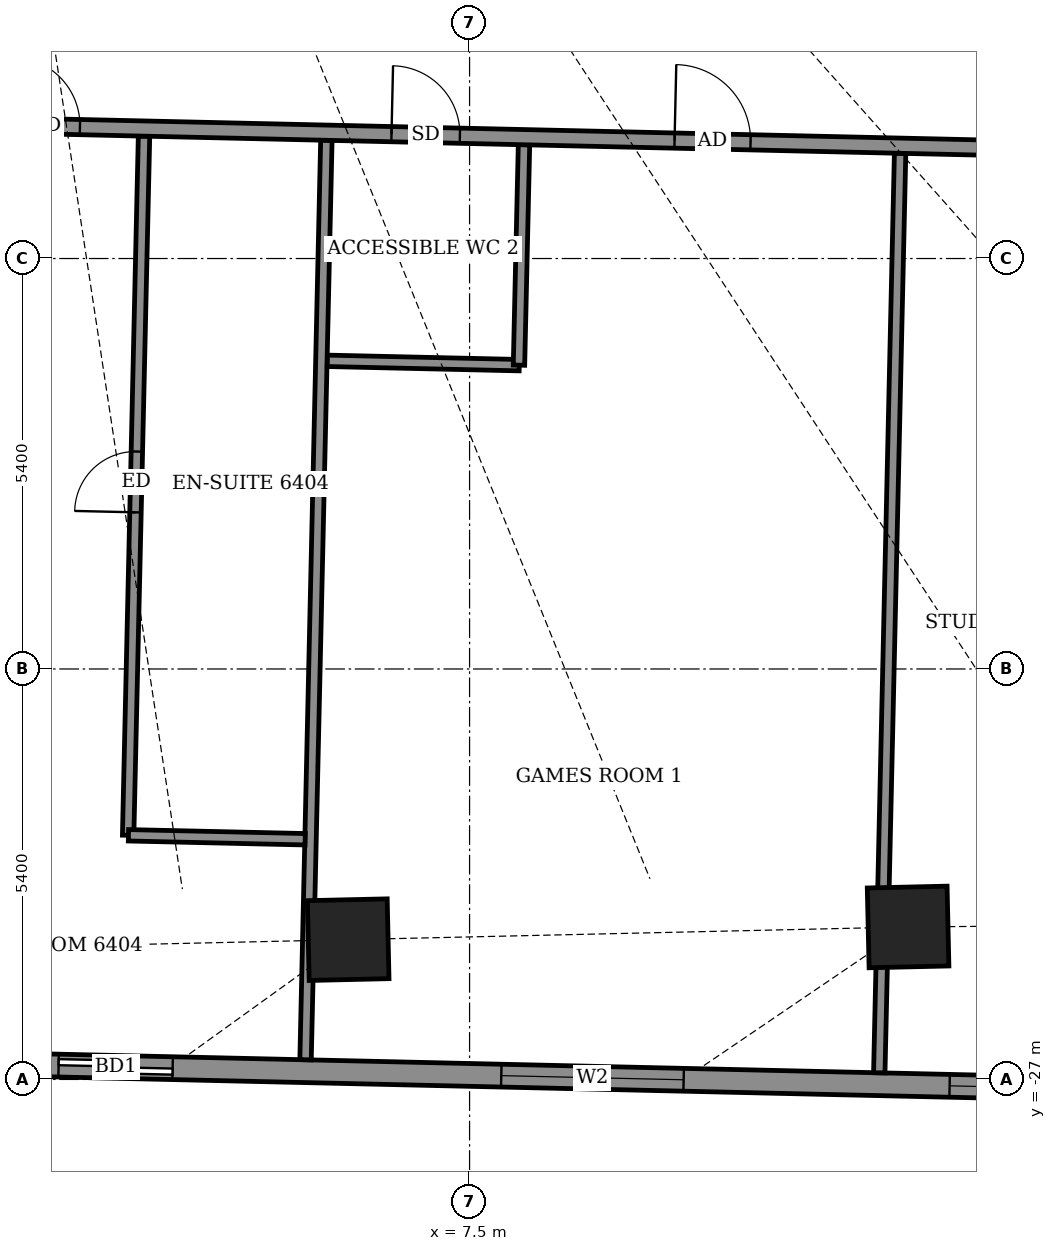
"""IFC4 building model, lengths in metres.
Left out: names, types, materials, properties, quantities, classifications, styles, units other than length and angle.
Written with IfcOpenShell. Run it as: python <this file> out.ifc"""

import sys

from ifc_helpers import new_model, si_unit, direction, frame, frame_2d, origin, origin_2d, place, context, subcontext, project, spatial, rectangle, extrude, element, fill, save


model = new_model("IFC4")
c1 = context("Model", 3, precision=1e-05, world=origin(), true_north=direction((0.0, 1.0)))
c2 = subcontext(c1, "Body", "Model", "MODEL_VIEW")
j1 = project(units=[si_unit("LENGTHUNIT", "METRE"), si_unit("PLANEANGLEUNIT", "RADIAN")], contexts=[c1])
p1 = place(None, origin())
s1 = spatial("IfcSite", under=j1, at=p1, CompositionType="ELEMENT")
p2 = place(p1, origin())
s2 = spatial("IfcBuilding", under=s1, at=p2, CompositionType="ELEMENT")
p3 = place(p2, frame((0.0, 0.0, 252.7)))
s3 = spatial("IfcBuildingStorey", under=s2, at=p3, CompositionType="ELEMENT", Elevation=252.7)
for number, where, z_axis, x_axis in (
    (1, (5.903, -25.161, -0.55), (0.0, 0.0, 1.0), (1.0, 0.023, 0.0)),
    (2, (13.269, -24.994, -0.55), (0.0, 0.0, 1.0), (1.0, 0.023, 0.0)),
):
    element("IfcColumn", number, at=place(p3, frame(where, z_axis=z_axis, x_axis=x_axis)), inside=s3, PredefinedType="COLUMN", context=c2, shape_type="SweptSolid", body=[
        extrude(rectangle(XDim=1.05, YDim=1.05, at=origin_2d()), origin(), (0.0, 0.0, 1.0), 4.6),
    ])
p4 = place(p3, frame((-22.95, -26.249, 0.0), z_axis=(0.0, 0.0, 1.0), x_axis=(0.999742196137, -0.022705533743, 0.0)))
e3 = element("IfcWall", 3, at=p4, inside=s3, PredefinedType="SOLIDWALL", context=c2, shape_type="SweptSolid", body=[
    extrude(rectangle(XDim=47.171, YDim=0.3, at=frame_2d((23.585, 0.0))), origin(), (0.0, 0.0, 1.0), 2.45),
])
p5 = place(p4, frame((2.534, 0.0, 0.0)))
e4 = element("IfcOpeningElement", 4, at=p5, cuts=e3, PredefinedType="OPENING", context=c2, shape_type="SweptSolid", body=[
    extrude(rectangle(XDim=1.5, YDim=2.4, at=frame_2d((0.75, 1.2))), frame((0.0, 0.16, 0.0), z_axis=(0.0, -1.0, 0.0), x_axis=(1.0, 0.0, 0.0)), (0.0, 0.0, 1.0), 0.32),
])
p6 = place(p4, frame((10.05, 0.0, 0.0)))
e5 = element("IfcOpeningElement", 5, at=p6, cuts=e3, PredefinedType="OPENING", context=c2, shape_type="SweptSolid", body=[
    extrude(rectangle(XDim=1.5, YDim=2.4, at=frame_2d((0.75, 1.2))), frame((0.0, 0.16, 0.0), z_axis=(0.0, -1.0, 0.0), x_axis=(1.0, 0.0, 0.0)), (0.0, 0.0, 1.0), 0.32),
])
p7 = place(p4, frame((15.599, 0.0, 0.0)))
e6 = element("IfcOpeningElement", 6, at=p7, cuts=e3, PredefinedType="OPENING", context=c2, shape_type="SweptSolid", body=[
    extrude(rectangle(XDim=1.5, YDim=2.4, at=frame_2d((0.75, 1.2))), frame((0.0, 0.16, 0.0), z_axis=(0.0, -1.0, 0.0), x_axis=(1.0, 0.0, 0.0)), (0.0, 0.0, 1.0), 0.32),
])
p8 = place(p4, frame((18.981, 0.0, 0.0)))
e7 = element("IfcOpeningElement", 7, at=p8, cuts=e3, PredefinedType="OPENING", context=c2, shape_type="SweptSolid", body=[
    extrude(rectangle(XDim=1.5, YDim=2.4, at=frame_2d((0.75, 1.2))), frame((0.0, 0.16, 0.0), z_axis=(0.0, -1.0, 0.0), x_axis=(1.0, 0.0, 0.0)), (0.0, 0.0, 1.0), 0.32),
])
p9 = place(p4, frame((25.05, 0.0, 0.0)))
e8 = element("IfcOpeningElement", 8, at=p9, cuts=e3, PredefinedType="OPENING", context=c2, shape_type="SweptSolid", body=[
    extrude(rectangle(XDim=1.5, YDim=2.4, at=frame_2d((0.75, 1.2))), frame((0.0, 0.16, 0.0), z_axis=(0.0, -1.0, 0.0), x_axis=(1.0, 0.0, 0.0)), (0.0, 0.0, 1.0), 0.32),
])
p10 = place(p4, frame((30.875, 0.0, 0.9)))
e9 = element("IfcOpeningElement", 9, at=p10, cuts=e3, PredefinedType="OPENING", context=c2, shape_type="SweptSolid", body=[
    extrude(rectangle(XDim=2.4, YDim=1.5, at=frame_2d((1.2, 0.75))), frame((0.0, 0.16, 0.0), z_axis=(0.0, -1.0, 0.0), x_axis=(1.0, 0.0, 0.0)), (0.0, 0.0, 1.0), 0.32),
])
p11 = place(p4, frame((36.775, 0.0, 0.9)))
e10 = element("IfcOpeningElement", 10, at=p11, cuts=e3, PredefinedType="OPENING", context=c2, shape_type="SweptSolid", body=[
    extrude(rectangle(XDim=1.2, YDim=1.5, at=frame_2d((0.6, 0.75))), frame((0.0, 0.16, 0.0), z_axis=(0.0, -1.0, 0.0), x_axis=(1.0, 0.0, 0.0)), (0.0, 0.0, 1.0), 0.32),
])
p12 = place(p4, frame((41.911, 0.0, 0.9)))
e11 = element("IfcOpeningElement", 11, at=p12, cuts=e3, PredefinedType="OPENING", context=c2, shape_type="SweptSolid", body=[
    extrude(rectangle(XDim=2.4, YDim=1.5, at=frame_2d((1.2, 0.75))), frame((0.0, 0.16, 0.0), z_axis=(0.0, -1.0, 0.0), x_axis=(1.0, 0.0, 0.0)), (0.0, 0.0, 1.0), 0.32),
])
p13 = place(p3, frame((5.342, -26.741, 0.0), z_axis=(0.0, 0.0, 1.0), x_axis=(0.02263844782, 0.9997437175, 0.0)))
e12 = element("IfcWall", 12, at=p13, inside=s3, PredefinedType="PARTITIONING", context=c2, shape_type="SweptSolid", body=[
    extrude(rectangle(XDim=12.1, YDim=0.15, at=frame_2d((6.05, 0.0))), origin(), (0.0, 0.0, 1.0), 2.45),
])
p14 = place(p3, frame((12.89, -26.913, 0.0), z_axis=(0.0, 0.0, 1.0), x_axis=(0.022658157282, 0.999743270999, 0.0)))
e13 = element("IfcWall", 13, at=p14, inside=s3, PredefinedType="PARTITIONING", context=c2, shape_type="SweptSolid", body=[
    extrude(rectangle(XDim=12.1, YDim=0.15, at=frame_2d((6.05, 0.0))), origin(), (0.0, 0.0, 1.0), 2.45),
])
p15 = place(p3, frame((3.008, -23.788, 0.0), z_axis=(0.0, 0.0, 1.0), x_axis=(0.02271477479, 0.999741986218, 0.0)))
e14 = element("IfcWall", 14, at=p15, inside=s3, PredefinedType="PARTITIONING", context=c2, shape_type="SweptSolid", body=[
    extrude(rectangle(XDim=9.2, YDim=0.15, at=frame_2d((4.6, 0.0))), origin(), (0.0, 0.0, 1.0), 2.65),
])
p16 = place(p15, frame((4.25, 0.0, 0.0)))
e15 = element("IfcOpeningElement", 15, at=p16, cuts=e14, PredefinedType="OPENING", context=c2, shape_type="SweptSolid", body=[
    extrude(rectangle(XDim=0.8, YDim=2.1, at=frame_2d((0.4, 1.05))), frame((0.0, 0.085, 0.0), z_axis=(0.0, -1.0, 0.0), x_axis=(1.0, 0.0, 0.0)), (0.0, 0.0, 1.0), 0.17),
])
p17 = place(p3, frame((3.012, -23.788, 0.0), z_axis=(0.0, 0.0, 1.0), x_axis=(0.999749954681, -0.022361308448, 0.0)))
e16 = element("IfcWall", 16, at=p17, inside=s3, PredefinedType="PARTITIONING", context=c2, shape_type="SweptSolid", body=[
    extrude(rectangle(XDim=2.325, YDim=0.15, at=frame_2d((1.163, 0.0))), origin(), (0.0, 0.0, 1.0), 2.65),
])
p18 = place(p3, frame((5.629, -17.546, 0.0), z_axis=(0.0, 0.0, 1.0), x_axis=(0.999744175585, -0.022618209135, 0.0)))
e17 = element("IfcWall", 17, at=p18, inside=s3, PredefinedType="PARTITIONING", context=c2, shape_type="SweptSolid", body=[
    extrude(rectangle(XDim=2.526, YDim=0.15, at=frame_2d((1.263, 0.0))), origin(), (0.0, 0.0, 1.0), 2.65),
])
p19 = place(p3, frame((8.15, -17.603, 0.0), z_axis=(0.0, 0.0, 1.0), x_axis=(0.022807433839, 0.999739876649, 0.0)))
e18 = element("IfcWall", 18, at=p19, inside=s3, PredefinedType="PARTITIONING", context=c2, shape_type="SweptSolid", body=[
    extrude(rectangle(XDim=2.901, YDim=0.15, at=frame_2d((1.45, 0.0))), origin(), (0.0, 0.0, 1.0), 4.05),
])
p20 = place(p3, frame((-25.619, -13.836, 0.0), z_axis=(0.0, 0.0, 1.0), x_axis=(0.999742808343, -0.022678561832, 0.0)))
e19 = element("IfcWall", 19, at=p20, inside=s3, PredefinedType="PARTITIONING", context=c2, shape_type="SweptSolid", body=[
    extrude(rectangle(XDim=48.282, YDim=0.2, at=frame_2d((24.141, 0.0))), origin(), (0.0, 0.0, 1.0), 2.45),
])
p21 = place(p20, frame((3.125, 0.0, 0.0)))
e20 = element("IfcOpeningElement", 20, at=p21, cuts=e19, PredefinedType="OPENING", context=c2, shape_type="SweptSolid", body=[
    extrude(rectangle(XDim=1.0, YDim=2.1, at=frame_2d((0.5, 1.05))), frame((0.0, 0.11, 0.0), z_axis=(0.0, -1.0, 0.0), x_axis=(1.0, 0.0, 0.0)), (0.0, 0.0, 1.0), 0.22),
])
p22 = place(p20, frame((9.5, 0.0, 0.0)))
e21 = element("IfcOpeningElement", 21, at=p22, cuts=e19, PredefinedType="OPENING", context=c2, shape_type="SweptSolid", body=[
    extrude(rectangle(XDim=0.9, YDim=2.1, at=frame_2d((0.45, 1.05))), frame((0.0, 0.11, 0.0), z_axis=(0.0, -1.0, 0.0), x_axis=(1.0, 0.0, 0.0)), (0.0, 0.0, 1.0), 0.22),
])
p23 = place(p20, frame((14.5, 0.0, 0.0)))
e22 = element("IfcOpeningElement", 22, at=p23, cuts=e19, PredefinedType="OPENING", context=c2, shape_type="SweptSolid", body=[
    extrude(rectangle(XDim=0.9, YDim=2.1, at=frame_2d((0.45, 1.05))), frame((0.0, 0.11, 0.0), z_axis=(0.0, -1.0, 0.0), x_axis=(1.0, 0.0, 0.0)), (0.0, 0.0, 1.0), 0.22),
])
p24 = place(p20, frame((17.1, 0.0, 0.0)))
e23 = element("IfcOpeningElement", 23, at=p24, cuts=e19, PredefinedType="OPENING", context=c2, shape_type="SweptSolid", body=[
    extrude(rectangle(XDim=0.9, YDim=2.1, at=frame_2d((0.45, 1.05))), frame((0.0, 0.11, 0.0), z_axis=(0.0, -1.0, 0.0), x_axis=(1.0, 0.0, 0.0)), (0.0, 0.0, 1.0), 0.22),
])
p25 = place(p20, frame((24.5, 0.0, 0.0)))
e24 = element("IfcOpeningElement", 24, at=p25, cuts=e19, PredefinedType="OPENING", context=c2, shape_type="SweptSolid", body=[
    extrude(rectangle(XDim=0.9, YDim=2.1, at=frame_2d((0.45, 1.05))), frame((0.0, 0.11, 0.0), z_axis=(0.0, -1.0, 0.0), x_axis=(1.0, 0.0, 0.0)), (0.0, 0.0, 1.0), 0.22),
])
p26 = place(p20, frame((27.1, 0.0, 0.0)))
e25 = element("IfcOpeningElement", 25, at=p26, cuts=e19, PredefinedType="OPENING", context=c2, shape_type="SweptSolid", body=[
    extrude(rectangle(XDim=0.9, YDim=2.1, at=frame_2d((0.45, 1.05))), frame((0.0, 0.11, 0.0), z_axis=(0.0, -1.0, 0.0), x_axis=(1.0, 0.0, 0.0)), (0.0, 0.0, 1.0), 0.22),
])
p27 = place(p20, frame((35.825, 0.0, 0.0)))
e26 = element("IfcOpeningElement", 26, at=p27, cuts=e19, PredefinedType="OPENING", context=c2, shape_type="SweptSolid", body=[
    extrude(rectangle(XDim=1.0, YDim=2.1, at=frame_2d((0.5, 1.05))), frame((0.0, 0.11, 0.0), z_axis=(0.0, -1.0, 0.0), x_axis=(1.0, 0.0, 0.0)), (0.0, 0.0, 1.0), 0.22),
])
p28 = place(p20, frame((32.1, 0.0, 0.0)))
e27 = element("IfcOpeningElement", 27, at=p28, cuts=e19, PredefinedType="OPENING", context=c2, shape_type="SweptSolid", body=[
    extrude(rectangle(XDim=0.9, YDim=2.1, at=frame_2d((0.45, 1.05))), frame((0.0, 0.11, 0.0), z_axis=(0.0, -1.0, 0.0), x_axis=(1.0, 0.0, 0.0)), (0.0, 0.0, 1.0), 0.22),
])
p29 = place(p20, frame((39.825, 0.0, 0.0)))
e28 = element("IfcOpeningElement", 28, at=p29, cuts=e19, PredefinedType="OPENING", context=c2, shape_type="SweptSolid", body=[
    extrude(rectangle(XDim=1.0, YDim=2.1, at=frame_2d((0.5, 1.05))), frame((0.0, 0.11, 0.0), z_axis=(0.0, -1.0, 0.0), x_axis=(1.0, 0.0, 0.0)), (0.0, 0.0, 1.0), 0.22),
])
p30 = place(p20, frame((47.083, 0.0, 0.0)))
e29 = element("IfcOpeningElement", 29, at=p30, cuts=e19, PredefinedType="OPENING", context=c2, shape_type="SweptSolid", body=[
    extrude(rectangle(XDim=1.0, YDim=2.1, at=frame_2d((0.5, 1.05))), frame((0.0, 0.11, 0.0), z_axis=(0.0, -1.0, 0.0), x_axis=(1.0, 0.0, 0.0)), (0.0, 0.0, 1.0), 0.22),
])
p31 = place(p9, origin())
e30 = element("IfcDoor", 30, at=p31, inside=s3, OperationType="SLIDING_TO_LEFT", PredefinedType="DOOR", context=c2, shape_type="SweptSolid", body=[
    extrude(rectangle(XDim=1.5, YDim=2.4, at=frame_2d((0.75, 1.2))), frame((0.0, 0.025, 0.0), z_axis=(0.0, -1.0, 0.0), x_axis=(1.0, 0.0, 0.0)), (0.0, 0.0, 1.0), 0.05),
])
fill(e8, e30)
p32 = place(p10, origin())
e31 = element("IfcWindow", 31, at=p32, inside=s3, PartitioningType="DOUBLE_PANEL_VERTICAL", PredefinedType="WINDOW", context=c2, shape_type="SweptSolid", body=[
    extrude(rectangle(XDim=2.4, YDim=1.5, at=frame_2d((1.2, 0.75))), frame((0.0, 0.03, 0.0), z_axis=(0.0, -1.0, 0.0), x_axis=(1.0, 0.0, 0.0)), (0.0, 0.0, 1.0), 0.06),
])
fill(e9, e31)
p33 = place(p11, origin())
e32 = element("IfcWindow", 32, at=p33, inside=s3, PartitioningType="SINGLE_PANEL", PredefinedType="WINDOW", context=c2, shape_type="SweptSolid", body=[
    extrude(rectangle(XDim=1.2, YDim=1.5, at=frame_2d((0.6, 0.75))), frame((0.0, 0.03, 0.0), z_axis=(0.0, -1.0, 0.0), x_axis=(1.0, 0.0, 0.0)), (0.0, 0.0, 1.0), 0.06),
])
fill(e10, e32)
p34 = place(p26, origin())
e33 = element("IfcDoor", 33, at=p34, inside=s3, OperationType="SINGLE_SWING_RIGHT", PredefinedType="DOOR", context=c2, shape_type="SweptSolid", body=[
    extrude(rectangle(XDim=0.9, YDim=2.1, at=frame_2d((0.45, 1.05))), frame((0.0, 0.025, 0.0), z_axis=(0.0, -1.0, 0.0), x_axis=(1.0, 0.0, 0.0)), (0.0, 0.0, 1.0), 0.05),
])
fill(e25, e33)
p35 = place(p16, origin())
e34 = element("IfcDoor", 34, at=p35, inside=s3, OperationType="SINGLE_SWING_RIGHT", PredefinedType="DOOR", context=c2, shape_type="SweptSolid", body=[
    extrude(rectangle(XDim=0.8, YDim=2.1, at=frame_2d((0.4, 1.05))), frame((0.0, 0.025, 0.0), z_axis=(0.0, -1.0, 0.0), x_axis=(1.0, 0.0, 0.0)), (0.0, 0.0, 1.0), 0.05),
])
fill(e15, e34)
p36 = place(p27, origin())
e35 = element("IfcDoor", 35, at=p36, inside=s3, OperationType="SINGLE_SWING_RIGHT", PredefinedType="DOOR", context=c2, shape_type="SweptSolid", body=[
    extrude(rectangle(XDim=1.0, YDim=2.1, at=frame_2d((0.5, 1.05))), frame((0.0, 0.025, 0.0), z_axis=(0.0, -1.0, 0.0), x_axis=(1.0, 0.0, 0.0)), (0.0, 0.0, 1.0), 0.05),
])
fill(e26, e35)
p37 = place(p28, origin())
e36 = element("IfcDoor", 36, at=p37, inside=s3, OperationType="SINGLE_SWING_RIGHT", PredefinedType="DOOR", context=c2, shape_type="SweptSolid", body=[
    extrude(rectangle(XDim=0.9, YDim=2.1, at=frame_2d((0.45, 1.05))), frame((0.0, 0.025, 0.0), z_axis=(0.0, -1.0, 0.0), x_axis=(1.0, 0.0, 0.0)), (0.0, 0.0, 1.0), 0.05),
])
fill(e27, e36)
save(model, sys.argv[1])
